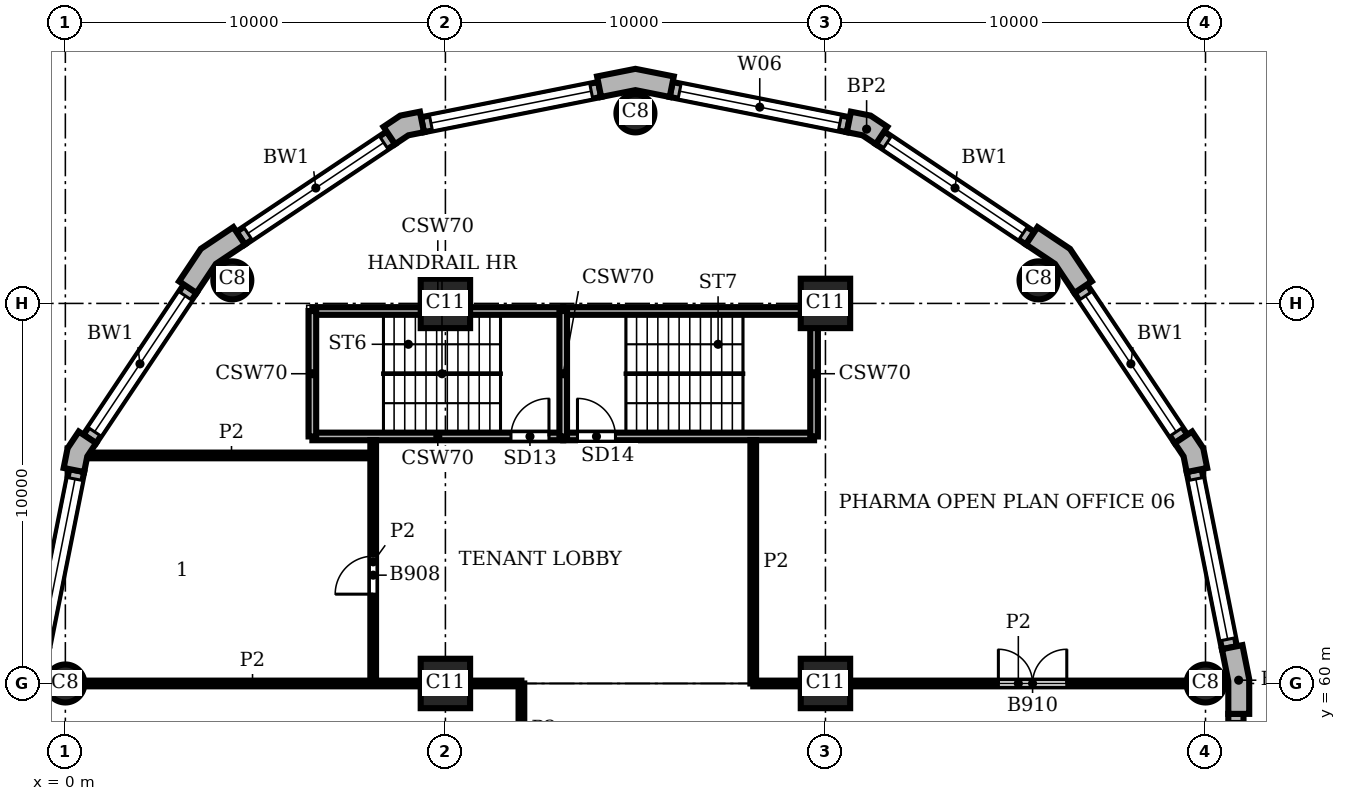
"""IFC4 building model, lengths in metres.
Left out: names, types, materials, properties, quantities, classifications, styles, units other than length and angle.
Written with IfcOpenShell. Run it as: python <this file> out.ifc"""

import sys

from ifc_helpers import new_model, si_unit, direction, frame, frame_2d, origin, origin_2d, place, context, subcontext, project, spatial, polyline, rectangle, circle, outline, extrude, element, fill, save


model = new_model("IFC4")
c1 = context("Model", 3, precision=1e-05, world=origin(), true_north=direction((0.0, 1.0)))
c2 = subcontext(c1, "Body", "Model", "MODEL_VIEW")
j1 = project(units=[si_unit("LENGTHUNIT", "METRE"), si_unit("PLANEANGLEUNIT", "RADIAN")], contexts=[c1])
p1 = place(None, origin())
s1 = spatial("IfcSite", under=j1, at=p1, CompositionType="ELEMENT")
p2 = place(p1, origin())
s2 = spatial("IfcBuilding", under=s1, at=p2, CompositionType="ELEMENT")
p3 = place(p2, frame((0.0, 0.0, 225.3)))
s3 = spatial("IfcBuildingStorey", under=s2, at=p3, CompositionType="ELEMENT", Elevation=225.3)
for number, where, z_axis, x_axis in (
    (1, (30.0, 60.0, 0.0), (0.0, 0.0, 1.0), (1.0, 0.0, 0.0)),
    (2, (25.607, 70.607, 0.0), (0.0, 0.0, 1.0), (1.0, 0.0, 0.0)),
    (3, (15.0, 75.0, 0.0), (0.0, 0.0, 1.0), (1.0, 0.0, 0.0)),
    (4, (4.393, 70.607, 0.0), (0.0, 0.0, 1.0), (1.0, 0.0, 0.0)),
    (5, (0.0, 60.0, 0.0), (0.0, 0.0, 1.0), (1.0, 0.0, 0.0)),
):
    element("IfcColumn", number, at=place(p3, frame(where, z_axis=z_axis, x_axis=x_axis)), inside=s3, PredefinedType="COLUMN", context=c2, shape_type="SweptSolid", body=[
        extrude(circle(Radius=0.5, at=origin_2d()), origin(), (0.0, 0.0, 1.0), 3.9),
    ])
for number, where, z_axis, x_axis in (
    (6, (10.0, 60.0, 0.0), (0.0, 0.0, 1.0), (1.0, 0.0, 0.0)),
    (7, (10.0, 70.0, 0.0), (0.0, 0.0, 1.0), (1.0, 0.0, 0.0)),
    (8, (20.0, 60.0, 0.0), (0.0, 0.0, 1.0), (1.0, 0.0, 0.0)),
    (9, (20.0, 70.0, 0.0), (0.0, 0.0, 1.0), (1.0, 0.0, 0.0)),
):
    element("IfcColumn", number, at=place(p3, frame(where, z_axis=z_axis, x_axis=x_axis)), inside=s3, PredefinedType="COLUMN", context=c2, shape_type="SweptSolid", body=[
        extrude(rectangle(XDim=1.3, YDim=1.3, at=origin_2d()), origin(), (0.0, 0.0, 1.0), 3.9),
    ])
p4 = place(p3, origin())
e10 = element("IfcWall", 10, at=p4, inside=s3, PredefinedType="SOLIDWALL", context=c2, shape_type="SweptSolid", body=[
    extrude(outline(polyline([(31.0, 59.2), (31.15, 59.2), (31.15, 60.113), (30.972, 61.009), (30.825, 60.98), (30.432, 60.902), (30.6, 60.059), (30.6, 59.2), (31.0, 59.2)])), origin(), (0.0, 0.0, 1.0), 3.9),
])
e11 = element("IfcWall", 11, at=p4, inside=s3, PredefinedType="SOLIDWALL", context=c2, shape_type="SweptSolid", body=[
    extrude(outline(polyline([(29.897, 65.641), (30.045, 65.67), (29.941, 66.189), (29.648, 66.629), (29.523, 66.545), (29.19, 66.323), (29.423, 65.974), (29.505, 65.563), (29.897, 65.641)])), origin(), (0.0, 0.0, 1.0), 3.9),
])
e12 = element("IfcWall", 12, at=p4, inside=s3, PredefinedType="SOLIDWALL", context=c2, shape_type="SweptSolid", body=[
    extrude(outline(polyline([(26.883, 70.497), (27.007, 70.58), (26.436, 71.436), (25.58, 72.007), (25.497, 71.883), (25.275, 71.55), (26.039, 71.039), (26.55, 70.275), (26.883, 70.497)])), origin(), (0.0, 0.0, 1.0), 3.9),
])
e13 = element("IfcWall", 13, at=p4, inside=s3, PredefinedType="SOLIDWALL", context=c2, shape_type="SweptSolid", body=[
    extrude(outline(polyline([(21.545, 74.523), (21.629, 74.648), (21.189, 74.941), (20.67, 75.045), (20.641, 74.897), (20.563, 74.505), (20.974, 74.423), (21.323, 74.19), (21.545, 74.523)])), origin(), (0.0, 0.0, 1.0), 3.9),
])
e14 = element("IfcWall", 14, at=p4, inside=s3, PredefinedType="SOLIDWALL", context=c2, shape_type="SweptSolid", body=[
    extrude(outline(polyline([(15.98, 75.825), (16.009, 75.972), (15.0, 76.173), (13.991, 75.972), (14.02, 75.825), (14.098, 75.432), (15.0, 75.612), (15.902, 75.432), (15.98, 75.825)])), origin(), (0.0, 0.0, 1.0), 3.9),
])
e15 = element("IfcWall", 15, at=p4, inside=s3, PredefinedType="SOLIDWALL", context=c2, shape_type="SweptSolid", body=[
    extrude(outline(polyline([(9.359, 74.897), (9.33, 75.045), (8.811, 74.941), (8.371, 74.648), (8.455, 74.523), (8.677, 74.19), (9.026, 74.423), (9.437, 74.505), (9.359, 74.897)])), origin(), (0.0, 0.0, 1.0), 3.9),
])
e16 = element("IfcWall", 16, at=p4, inside=s3, PredefinedType="SOLIDWALL", context=c2, shape_type="SweptSolid", body=[
    extrude(outline(polyline([(4.503, 71.883), (4.42, 72.007), (3.564, 71.436), (2.993, 70.58), (3.117, 70.497), (3.45, 70.275), (3.961, 71.039), (4.725, 71.55), (4.503, 71.883)])), origin(), (0.0, 0.0, 1.0), 3.9),
])
e17 = element("IfcWall", 17, at=p4, inside=s3, PredefinedType="SOLIDWALL", context=c2, shape_type="SweptSolid", body=[
    extrude(outline(polyline([(0.477, 66.545), (0.352, 66.629), (0.059, 66.189), (-0.045, 65.67), (0.103, 65.641), (0.495, 65.563), (0.577, 65.974), (0.81, 66.323), (0.477, 66.545)])), origin(), (0.0, 0.0, 1.0), 3.9),
])
p5 = place(p3, frame((30.8, 40.8, 0.0), z_axis=(0.0, 0.0, 1.0), x_axis=(0.0, 1.0, 0.0)))
e18 = element("IfcWall", 18, at=p5, inside=s3, PredefinedType="SOLIDWALL", context=c2, shape_type="SweptSolid", body=[
    extrude(rectangle(XDim=18.4, YDim=0.4, at=frame_2d((9.2, 0.0))), origin(), (0.0, 0.0, 1.0), 3.9),
])
p6 = place(p5, frame((0.2, 0.0, 0.9)))
e19 = element("IfcOpeningElement", 19, at=p6, cuts=e18, PredefinedType="OPENING", context=c2, shape_type="SweptSolid", body=[
    extrude(rectangle(XDim=8.0, YDim=2.35, at=frame_2d((4.0, 1.175))), frame((0.0, 0.21, 0.0), z_axis=(0.0, -1.0, 0.0), x_axis=(1.0, 0.0, 0.0)), (0.0, 0.0, 1.0), 0.42),
])
p7 = place(p5, frame((10.2, 0.0, 0.9)))
e20 = element("IfcOpeningElement", 20, at=p7, cuts=e18, PredefinedType="OPENING", context=c2, shape_type="SweptSolid", body=[
    extrude(rectangle(XDim=8.0, YDim=2.35, at=frame_2d((4.0, 1.175))), frame((0.0, 0.21, 0.0), z_axis=(0.0, -1.0, 0.0), x_axis=(1.0, 0.0, 0.0)), (0.0, 0.0, 1.0), 0.42),
])
p8 = place(p3, frame((30.629, 60.941, 0.0), z_axis=(0.0, 0.0, 1.0), x_axis=(-0.195098533057, 0.98078364709, 0.0)))
e21 = element("IfcWall", 21, at=p8, inside=s3, PredefinedType="SOLIDWALL", context=c2, shape_type="SweptSolid", body=[
    extrude(rectangle(XDim=4.753, YDim=0.4, at=frame_2d((2.376, 0.0))), origin(), (0.0, 0.0, 1.0), 3.9),
])
p9 = place(p8, frame((0.226, 0.0, 0.9)))
e22 = element("IfcOpeningElement", 22, at=p9, cuts=e21, PredefinedType="OPENING", context=c2, shape_type="SweptSolid", body=[
    extrude(rectangle(XDim=4.3, YDim=2.35, at=frame_2d((2.15, 1.175))), frame((0.0, 0.21, 0.0), z_axis=(0.0, -1.0, 0.0), x_axis=(1.0, 0.0, 0.0)), (0.0, 0.0, 1.0), 0.42),
])
p10 = place(p3, frame((29.357, 66.434, 0.0), z_axis=(0.0, 0.0, 1.0), x_axis=(-0.555541552266, 0.831488775454, 0.0)))
e23 = element("IfcWall", 23, at=p10, inside=s3, PredefinedType="SOLIDWALL", context=c2, shape_type="SweptSolid", body=[
    extrude(rectangle(XDim=4.753, YDim=0.4, at=frame_2d((2.376, 0.0))), origin(), (0.0, 0.0, 1.0), 3.9),
])
p11 = place(p10, frame((0.226, 0.0, 0.9)))
e24 = element("IfcOpeningElement", 24, at=p11, cuts=e23, PredefinedType="OPENING", context=c2, shape_type="SweptSolid", body=[
    extrude(rectangle(XDim=4.3, YDim=2.35, at=frame_2d((2.15, 1.175))), frame((0.0, 0.21, 0.0), z_axis=(0.0, -1.0, 0.0), x_axis=(1.0, 0.0, 0.0)), (0.0, 0.0, 1.0), 0.42),
])
p12 = place(p3, frame((25.386, 71.716, 0.0), z_axis=(0.0, 0.0, 1.0), x_axis=(-0.831488775454, 0.555541552266, 0.0)))
e25 = element("IfcWall", 25, at=p12, inside=s3, PredefinedType="SOLIDWALL", context=c2, shape_type="SweptSolid", body=[
    extrude(rectangle(XDim=4.753, YDim=0.4, at=frame_2d((2.376, 0.0))), origin(), (0.0, 0.0, 1.0), 3.9),
])
p13 = place(p12, frame((0.226, 0.0, 0.9)))
e26 = element("IfcOpeningElement", 26, at=p13, cuts=e25, PredefinedType="OPENING", context=c2, shape_type="SweptSolid", body=[
    extrude(rectangle(XDim=4.3, YDim=2.35, at=frame_2d((2.15, 1.175))), frame((0.0, 0.21, 0.0), z_axis=(0.0, -1.0, 0.0), x_axis=(1.0, 0.0, 0.0)), (0.0, 0.0, 1.0), 0.42),
])
p14 = place(p3, frame((20.602, 74.701, 0.0), z_axis=(0.0, 0.0, 1.0), x_axis=(-0.98078364709, 0.195098533057, 0.0)))
e27 = element("IfcWall", 27, at=p14, inside=s3, PredefinedType="SOLIDWALL", context=c2, shape_type="SweptSolid", body=[
    extrude(rectangle(XDim=4.753, YDim=0.4, at=frame_2d((2.376, 0.0))), origin(), (0.0, 0.0, 1.0), 3.9),
])
p15 = place(p14, frame((0.226, 0.0, 0.9)))
e28 = element("IfcOpeningElement", 28, at=p15, cuts=e27, PredefinedType="OPENING", context=c2, shape_type="SweptSolid", body=[
    extrude(rectangle(XDim=4.3, YDim=2.35, at=frame_2d((2.15, 1.175))), frame((0.0, 0.21, 0.0), z_axis=(0.0, -1.0, 0.0), x_axis=(1.0, 0.0, 0.0)), (0.0, 0.0, 1.0), 0.42),
])
p16 = place(p3, frame((14.059, 75.629, 0.0), z_axis=(0.0, 0.0, 1.0), x_axis=(-0.98078364709, -0.195098533057, 0.0)))
e29 = element("IfcWall", 29, at=p16, inside=s3, PredefinedType="SOLIDWALL", context=c2, shape_type="SweptSolid", body=[
    extrude(rectangle(XDim=4.753, YDim=0.4, at=frame_2d((2.376, 0.0))), origin(), (0.0, 0.0, 1.0), 3.9),
])
p17 = place(p16, frame((0.226, 0.0, 0.9)))
e30 = element("IfcOpeningElement", 30, at=p17, cuts=e29, PredefinedType="OPENING", context=c2, shape_type="SweptSolid", body=[
    extrude(rectangle(XDim=4.3, YDim=2.35, at=frame_2d((2.15, 1.175))), frame((0.0, 0.21, 0.0), z_axis=(0.0, -1.0, 0.0), x_axis=(1.0, 0.0, 0.0)), (0.0, 0.0, 1.0), 0.42),
])
p18 = place(p3, frame((8.566, 74.357, 0.0), z_axis=(0.0, 0.0, 1.0), x_axis=(-0.831488775454, -0.555541552266, 0.0)))
e31 = element("IfcWall", 31, at=p18, inside=s3, PredefinedType="SOLIDWALL", context=c2, shape_type="SweptSolid", body=[
    extrude(rectangle(XDim=4.753, YDim=0.4, at=frame_2d((2.376, 0.0))), origin(), (0.0, 0.0, 1.0), 3.9),
])
p19 = place(p18, frame((0.226, 0.0, 0.9)))
e32 = element("IfcOpeningElement", 32, at=p19, cuts=e31, PredefinedType="OPENING", context=c2, shape_type="SweptSolid", body=[
    extrude(rectangle(XDim=4.3, YDim=2.35, at=frame_2d((2.15, 1.175))), frame((0.0, 0.21, 0.0), z_axis=(0.0, -1.0, 0.0), x_axis=(1.0, 0.0, 0.0)), (0.0, 0.0, 1.0), 0.42),
])
p20 = place(p3, frame((3.284, 70.386, 0.0), z_axis=(0.0, 0.0, 1.0), x_axis=(-0.555541552266, -0.831488775454, 0.0)))
e33 = element("IfcWall", 33, at=p20, inside=s3, PredefinedType="SOLIDWALL", context=c2, shape_type="SweptSolid", body=[
    extrude(rectangle(XDim=4.753, YDim=0.4, at=frame_2d((2.376, 0.0))), origin(), (0.0, 0.0, 1.0), 3.9),
])
p21 = place(p20, frame((0.226, 0.0, 0.9)))
e34 = element("IfcOpeningElement", 34, at=p21, cuts=e33, PredefinedType="OPENING", context=c2, shape_type="SweptSolid", body=[
    extrude(rectangle(XDim=4.3, YDim=2.35, at=frame_2d((2.15, 1.175))), frame((0.0, 0.21, 0.0), z_axis=(0.0, -1.0, 0.0), x_axis=(1.0, 0.0, 0.0)), (0.0, 0.0, 1.0), 0.42),
])
p22 = place(p3, frame((0.299, 65.602, 0.0), z_axis=(0.0, 0.0, 1.0), x_axis=(-0.195098533057, -0.98078364709, 0.0)))
e35 = element("IfcWall", 35, at=p22, inside=s3, PredefinedType="SOLIDWALL", context=c2, shape_type="SweptSolid", body=[
    extrude(rectangle(XDim=4.753, YDim=0.4, at=frame_2d((2.376, 0.0))), origin(), (0.0, 0.0, 1.0), 3.9),
])
p23 = place(p22, frame((0.226, 0.0, 0.9)))
e36 = element("IfcOpeningElement", 36, at=p23, cuts=e35, PredefinedType="OPENING", context=c2, shape_type="SweptSolid", body=[
    extrude(rectangle(XDim=4.3, YDim=2.35, at=frame_2d((2.15, 1.175))), frame((0.0, 0.21, 0.0), z_axis=(0.0, -1.0, 0.0), x_axis=(1.0, 0.0, 0.0)), (0.0, 0.0, 1.0), 0.42),
])
p24 = place(p3, frame((6.5, 66.5, 0.0), z_axis=(0.0, 0.0, 1.0), x_axis=(1.0, 0.0, 0.0)))
e37 = element("IfcWall", 37, at=p24, inside=s3, PredefinedType="SHEAR", context=c2, shape_type="SweptSolid", body=[
    extrude(rectangle(XDim=6.6, YDim=0.2, at=frame_2d((3.3, 0.0))), origin(), (0.0, 0.0, 1.0), 3.58),
])
p25 = place(p24, frame((5.225, 0.0, 0.0)))
e38 = element("IfcOpeningElement", 38, at=p25, cuts=e37, PredefinedType="OPENING", context=c2, shape_type="SweptSolid", body=[
    extrude(rectangle(XDim=1.0, YDim=2.1, at=frame_2d((0.5, 1.05))), frame((0.0, 0.11, 0.0), z_axis=(0.0, -1.0, 0.0), x_axis=(1.0, 0.0, 0.0)), (0.0, 0.0, 1.0), 0.22),
])
p26 = place(p3, frame((13.1, 66.5, 0.0), z_axis=(0.0, 0.0, 1.0), x_axis=(1.0, 0.0, 0.0)))
e39 = element("IfcWall", 39, at=p26, inside=s3, PredefinedType="SHEAR", context=c2, shape_type="SweptSolid", body=[
    extrude(rectangle(XDim=6.6, YDim=0.2, at=frame_2d((3.3, 0.0))), origin(), (0.0, 0.0, 1.0), 3.58),
])
p27 = place(p26, frame((0.375, 0.0, 0.0)))
e40 = element("IfcOpeningElement", 40, at=p27, cuts=e39, PredefinedType="OPENING", context=c2, shape_type="SweptSolid", body=[
    extrude(rectangle(XDim=1.0, YDim=2.1, at=frame_2d((0.5, 1.05))), frame((0.0, 0.11, 0.0), z_axis=(0.0, -1.0, 0.0), x_axis=(1.0, 0.0, 0.0)), (0.0, 0.0, 1.0), 0.22),
])
p28 = place(p3, frame((6.5, 69.8, 0.0), z_axis=(0.0, 0.0, 1.0), x_axis=(1.0, 0.0, 0.0)))
e41 = element("IfcWall", 41, at=p28, inside=s3, PredefinedType="SHEAR", context=c2, shape_type="SweptSolid", body=[
    extrude(rectangle(XDim=6.6, YDim=0.2, at=frame_2d((3.3, 0.0))), origin(), (0.0, 0.0, 1.0), 3.58),
])
p29 = place(p3, frame((13.1, 69.8, 0.0), z_axis=(0.0, 0.0, 1.0), x_axis=(1.0, 0.0, 0.0)))
e42 = element("IfcWall", 42, at=p29, inside=s3, PredefinedType="SHEAR", context=c2, shape_type="SweptSolid", body=[
    extrude(rectangle(XDim=6.6, YDim=0.2, at=frame_2d((3.3, 0.0))), origin(), (0.0, 0.0, 1.0), 3.58),
])
for number, where, z_axis, x_axis in (
    (43, (6.5, 66.5, 0.0), (0.0, 0.0, 1.0), (0.0, 1.0, 0.0)),
    (44, (13.1, 66.5, 0.0), (0.0, 0.0, 1.0), (0.0, 1.0, 0.0)),
    (45, (19.7, 66.5, 0.0), (0.0, 0.0, 1.0), (0.0, 1.0, 0.0)),
):
    element("IfcWall", number, at=place(p3, frame(where, z_axis=z_axis, x_axis=x_axis)), inside=s3, PredefinedType="SHEAR", context=c2, shape_type="SweptSolid", body=[
        extrude(rectangle(XDim=3.3, YDim=0.2, at=frame_2d((1.65, 0.0))), origin(), (0.0, 0.0, 1.0), 3.58),
    ])
p30 = place(p3, frame((8.1, 60.0, 0.0), z_axis=(0.0, 0.0, 1.0), x_axis=(0.0, 1.0, 0.0)))
e46 = element("IfcWall", 46, at=p30, inside=s3, PredefinedType="PARTITIONING", context=c2, shape_type="SweptSolid", body=[
    extrude(rectangle(XDim=6.4, YDim=0.15, at=frame_2d((3.2, 0.0))), origin(), (0.0, 0.0, 1.0), 3.58),
])
p31 = place(p30, frame((2.35, 0.0, 0.0)))
e47 = element("IfcOpeningElement", 47, at=p31, cuts=e46, PredefinedType="OPENING", context=c2, shape_type="SweptSolid", body=[
    extrude(rectangle(XDim=1.0, YDim=2.1, at=frame_2d((0.5, 1.05))), frame((0.0, 0.085, 0.0), z_axis=(0.0, -1.0, 0.0), x_axis=(1.0, 0.0, 0.0)), (0.0, 0.0, 1.0), 0.17),
])
p32 = place(p3, frame((12.0, 57.6, 0.0), z_axis=(0.0, 0.0, 1.0), x_axis=(0.0, 1.0, 0.0)))
e48 = element("IfcWall", 48, at=p32, inside=s3, PredefinedType="PARTITIONING", context=c2, shape_type="SweptSolid", body=[
    extrude(rectangle(XDim=2.4, YDim=0.15, at=frame_2d((1.2, 0.0))), origin(), (0.0, 0.0, 1.0), 3.58),
])
p33 = place(p3, frame((18.1, 60.0, 0.0), z_axis=(0.0, 0.0, 1.0), x_axis=(0.0, 1.0, 0.0)))
e49 = element("IfcWall", 49, at=p33, inside=s3, PredefinedType="PARTITIONING", context=c2, shape_type="SweptSolid", body=[
    extrude(rectangle(XDim=6.4, YDim=0.15, at=frame_2d((3.2, 0.0))), origin(), (0.0, 0.0, 1.0), 3.58),
])
p34 = place(p3, frame((0.5, 60.0, 0.0), z_axis=(0.0, 0.0, 1.0), x_axis=(1.0, 0.0, 0.0)))
e50 = element("IfcWall", 50, at=p34, inside=s3, PredefinedType="PARTITIONING", context=c2, shape_type="SweptSolid", body=[
    extrude(rectangle(XDim=8.85, YDim=0.15, at=frame_2d((4.425, 0.0))), origin(), (0.0, 0.0, 1.0), 3.58),
])
p35 = place(p3, frame((10.65, 60.0, 0.0), z_axis=(0.0, 0.0, 1.0), x_axis=(1.0, 0.0, 0.0)))
e51 = element("IfcWall", 51, at=p35, inside=s3, PredefinedType="PARTITIONING", context=c2, shape_type="SweptSolid", body=[
    extrude(rectangle(XDim=1.35, YDim=0.15, at=frame_2d((0.675, 0.0))), origin(), (0.0, 0.0, 1.0), 3.58),
])
p36 = place(p3, frame((18.1, 60.0, 0.0), z_axis=(0.0, 0.0, 1.0), x_axis=(1.0, 0.0, 0.0)))
e52 = element("IfcWall", 52, at=p36, inside=s3, PredefinedType="PARTITIONING", context=c2, shape_type="SweptSolid", body=[
    extrude(rectangle(XDim=1.25, YDim=0.15, at=frame_2d((0.625, 0.0))), origin(), (0.0, 0.0, 1.0), 3.58),
])
p37 = place(p3, frame((20.65, 60.0, 0.0), z_axis=(0.0, 0.0, 1.0), x_axis=(1.0, 0.0, 0.0)))
e53 = element("IfcWall", 53, at=p37, inside=s3, PredefinedType="PARTITIONING", context=c2, shape_type="SweptSolid", body=[
    extrude(rectangle(XDim=8.85, YDim=0.15, at=frame_2d((4.425, 0.0))), origin(), (0.0, 0.0, 1.0), 3.58),
])
p38 = place(p37, frame((3.9, 0.0, 0.0)))
e54 = element("IfcOpeningElement", 54, at=p38, cuts=e53, PredefinedType="OPENING", context=c2, shape_type="SweptSolid", body=[
    extrude(rectangle(XDim=1.8, YDim=2.1, at=frame_2d((0.9, 1.05))), frame((0.0, 0.085, 0.0), z_axis=(0.0, -1.0, 0.0), x_axis=(1.0, 0.0, 0.0)), (0.0, 0.0, 1.0), 0.17),
])
p39 = place(p3, frame((0.644, 66.0, 0.0), z_axis=(0.0, 0.0, 1.0), x_axis=(1.0, 0.0, 0.0)))
e55 = element("IfcWall", 55, at=p39, inside=s3, PredefinedType="PARTITIONING", context=c2, shape_type="SweptSolid", body=[
    extrude(rectangle(XDim=7.456, YDim=0.15, at=frame_2d((3.728, 0.0))), origin(), (0.0, 0.0, 1.0), 3.58),
])
p40 = place(p9, origin())
e56 = element("IfcWindow", 56, at=p40, inside=s3, PartitioningType="SINGLE_PANEL", PredefinedType="WINDOW", context=c2, shape_type="SweptSolid", body=[
    extrude(rectangle(XDim=4.3, YDim=2.35, at=frame_2d((2.15, 1.175))), frame((0.0, 0.16, 0.0), z_axis=(0.0, -1.0, 0.0), x_axis=(1.0, 0.0, 0.0)), (0.0, 0.0, 1.0), 0.06),
])
fill(e22, e56)
p41 = place(p11, origin())
e57 = element("IfcWindow", 57, at=p41, inside=s3, PartitioningType="SINGLE_PANEL", PredefinedType="WINDOW", context=c2, shape_type="SweptSolid", body=[
    extrude(rectangle(XDim=4.3, YDim=2.35, at=frame_2d((2.15, 1.175))), frame((0.0, 0.16, 0.0), z_axis=(0.0, -1.0, 0.0), x_axis=(1.0, 0.0, 0.0)), (0.0, 0.0, 1.0), 0.06),
])
fill(e24, e57)
p42 = place(p13, origin())
e58 = element("IfcWindow", 58, at=p42, inside=s3, PartitioningType="SINGLE_PANEL", PredefinedType="WINDOW", context=c2, shape_type="SweptSolid", body=[
    extrude(rectangle(XDim=4.3, YDim=2.35, at=frame_2d((2.15, 1.175))), frame((0.0, 0.16, 0.0), z_axis=(0.0, -1.0, 0.0), x_axis=(1.0, 0.0, 0.0)), (0.0, 0.0, 1.0), 0.06),
])
fill(e26, e58)
p43 = place(p15, origin())
e59 = element("IfcWindow", 59, at=p43, inside=s3, PartitioningType="SINGLE_PANEL", PredefinedType="WINDOW", context=c2, shape_type="SweptSolid", body=[
    extrude(rectangle(XDim=4.3, YDim=2.35, at=frame_2d((2.15, 1.175))), frame((0.0, 0.16, 0.0), z_axis=(0.0, -1.0, 0.0), x_axis=(1.0, 0.0, 0.0)), (0.0, 0.0, 1.0), 0.06),
])
fill(e28, e59)
p44 = place(p17, origin())
e60 = element("IfcWindow", 60, at=p44, inside=s3, PartitioningType="SINGLE_PANEL", PredefinedType="WINDOW", context=c2, shape_type="SweptSolid", body=[
    extrude(rectangle(XDim=4.3, YDim=2.35, at=frame_2d((2.15, 1.175))), frame((0.0, 0.16, 0.0), z_axis=(0.0, -1.0, 0.0), x_axis=(1.0, 0.0, 0.0)), (0.0, 0.0, 1.0), 0.06),
])
fill(e30, e60)
p45 = place(p19, origin())
e61 = element("IfcWindow", 61, at=p45, inside=s3, PartitioningType="SINGLE_PANEL", PredefinedType="WINDOW", context=c2, shape_type="SweptSolid", body=[
    extrude(rectangle(XDim=4.3, YDim=2.35, at=frame_2d((2.15, 1.175))), frame((0.0, 0.16, 0.0), z_axis=(0.0, -1.0, 0.0), x_axis=(1.0, 0.0, 0.0)), (0.0, 0.0, 1.0), 0.06),
])
fill(e32, e61)
p46 = place(p21, origin())
e62 = element("IfcWindow", 62, at=p46, inside=s3, PartitioningType="SINGLE_PANEL", PredefinedType="WINDOW", context=c2, shape_type="SweptSolid", body=[
    extrude(rectangle(XDim=4.3, YDim=2.35, at=frame_2d((2.15, 1.175))), frame((0.0, 0.16, 0.0), z_axis=(0.0, -1.0, 0.0), x_axis=(1.0, 0.0, 0.0)), (0.0, 0.0, 1.0), 0.06),
])
fill(e34, e62)
p47 = place(p23, origin())
e63 = element("IfcWindow", 63, at=p47, inside=s3, PartitioningType="SINGLE_PANEL", PredefinedType="WINDOW", context=c2, shape_type="SweptSolid", body=[
    extrude(rectangle(XDim=4.3, YDim=2.35, at=frame_2d((2.15, 1.175))), frame((0.0, 0.16, 0.0), z_axis=(0.0, -1.0, 0.0), x_axis=(1.0, 0.0, 0.0)), (0.0, 0.0, 1.0), 0.06),
])
fill(e36, e63)
p48 = place(p25, origin())
e64 = element("IfcDoor", 64, at=p48, inside=s3, OperationType="SINGLE_SWING_RIGHT", PredefinedType="DOOR", context=c2, shape_type="SweptSolid", body=[
    extrude(rectangle(XDim=1.0, YDim=2.1, at=frame_2d((0.5, 1.05))), frame((0.0, 0.025, 0.0), z_axis=(0.0, -1.0, 0.0), x_axis=(1.0, 0.0, 0.0)), (0.0, 0.0, 1.0), 0.05),
])
fill(e38, e64)
p49 = place(p27, origin())
e65 = element("IfcDoor", 65, at=p49, inside=s3, OperationType="SINGLE_SWING_LEFT", PredefinedType="DOOR", context=c2, shape_type="SweptSolid", body=[
    extrude(rectangle(XDim=1.0, YDim=2.1, at=frame_2d((0.5, 1.05))), frame((0.0, 0.025, 0.0), z_axis=(0.0, -1.0, 0.0), x_axis=(1.0, 0.0, 0.0)), (0.0, 0.0, 1.0), 0.05),
])
fill(e40, e65)
p50 = place(p31, origin())
e66 = element("IfcDoor", 66, at=p50, inside=s3, OperationType="SINGLE_SWING_LEFT", PredefinedType="DOOR", context=c2, shape_type="SweptSolid", body=[
    extrude(rectangle(XDim=1.0, YDim=2.1, at=frame_2d((0.5, 1.05))), frame((0.0, 0.025, 0.0), z_axis=(0.0, -1.0, 0.0), x_axis=(1.0, 0.0, 0.0)), (0.0, 0.0, 1.0), 0.05),
])
fill(e47, e66)
p51 = place(p38, origin())
e67 = element("IfcDoor", 67, at=p51, inside=s3, OperationType="DOUBLE_DOOR_SINGLE_SWING", PredefinedType="DOOR", context=c2, shape_type="SweptSolid", body=[
    extrude(rectangle(XDim=1.8, YDim=2.1, at=frame_2d((0.9, 1.05))), frame((0.0, 0.025, 0.0), z_axis=(0.0, -1.0, 0.0), x_axis=(1.0, 0.0, 0.0)), (0.0, 0.0, 1.0), 0.05),
])
fill(e54, e67)
save(model, sys.argv[1])
